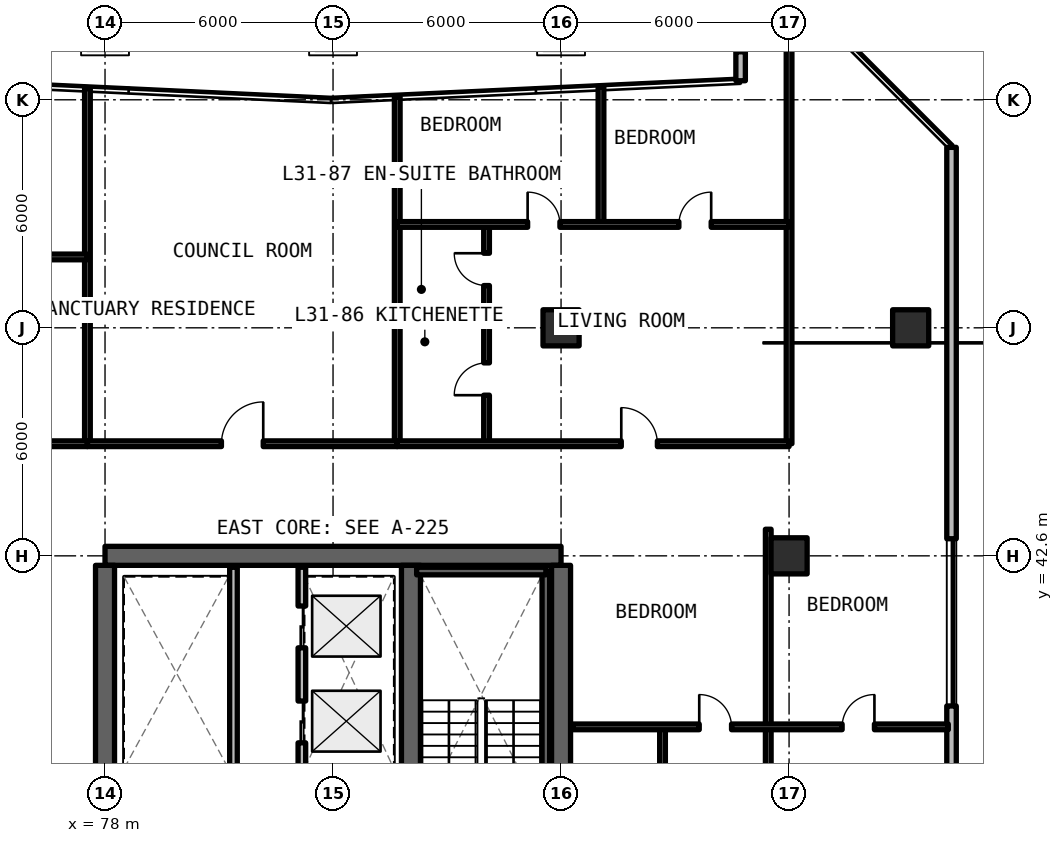
"""IFC4 building model, lengths in metres.
Left out: names, types, materials, properties, quantities, classifications, styles, units other than length and angle.
Written with IfcOpenShell. Run it as: python <this file> out.ifc"""

import sys

from ifc_helpers import new_model, si_unit, direction, frame, frame_2d, origin, origin_2d, place, context, subcontext, project, spatial, rectangle, extrude, element, fill, save


model = new_model("IFC4")
c1 = context("Model", 3, precision=1e-05, world=origin(), true_north=direction((0.0, 1.0)))
c2 = subcontext(c1, "Body", "Model", "MODEL_VIEW")
j1 = project(units=[si_unit("LENGTHUNIT", "METRE"), si_unit("PLANEANGLEUNIT", "RADIAN")], contexts=[c1])
p1 = place(None, origin())
s1 = spatial("IfcSite", under=j1, at=p1, CompositionType="ELEMENT")
p2 = place(p1, origin())
s2 = spatial("IfcBuilding", under=s1, at=p2, CompositionType="ELEMENT")
p3 = place(p2, frame((0.0, 0.0, 112.2)))
s3 = spatial("IfcBuildingStorey", under=s2, at=p3, CompositionType="ELEMENT", Elevation=112.2)
p4 = place(p3, frame((90.0, 42.6, 0.0), z_axis=(0.0, 0.0, 1.0), x_axis=(-1.0, 0.0, 0.0)))
e1 = element("IfcWall", 1, at=p4, inside=s3, PredefinedType="SHEAR", context=c2, shape_type="SweptSolid", body=[
    extrude(rectangle(XDim=12.0, YDim=0.5, at=frame_2d((6.0, 0.0))), origin(), (0.0, 0.0, 1.0), 3.63),
])
p5 = place(p3, frame((90.0, 24.85, 0.0), z_axis=(0.0, 0.0, 1.0), x_axis=(0.0, 1.0, 0.0)))
e2 = element("IfcWall", 2, at=p5, inside=s3, PredefinedType="SHEAR", context=c2, shape_type="SweptSolid", body=[
    extrude(rectangle(XDim=17.5, YDim=0.5, at=frame_2d((8.75, 0.0))), origin(), (0.0, 0.0, 1.0), 3.63),
])
p6 = place(p3, frame((78.0, 36.8, 0.0), z_axis=(0.0, 0.0, 1.0), x_axis=(0.0, 1.0, 0.0)))
e3 = element("IfcWall", 3, at=p6, inside=s3, PredefinedType="SHEAR", context=c2, shape_type="SweptSolid", body=[
    extrude(rectangle(XDim=5.55, YDim=0.5, at=frame_2d((2.775, 0.0))), origin(), (0.0, 0.0, 1.0), 3.63),
])
p7 = place(p3, frame((86.05, 24.85, 0.0), z_axis=(0.0, 0.0, 1.0), x_axis=(0.0, 1.0, 0.0)))
e4 = element("IfcWall", 4, at=p7, inside=s3, PredefinedType="SHEAR", context=c2, shape_type="SweptSolid", body=[
    extrude(rectangle(XDim=17.5, YDim=0.5, at=frame_2d((8.75, 0.0))), origin(), (0.0, 0.0, 1.0), 3.63),
])
p8 = place(p7, frame((0.4, 0.0, 0.0)))
e5 = element("IfcOpeningElement", 5, at=p8, cuts=e4, PredefinedType="OPENING", context=c2, shape_type="SweptSolid", body=[
    extrude(rectangle(XDim=1.15, YDim=2.15, at=frame_2d((0.575, 1.075))), frame((0.0, 0.26, 0.0), z_axis=(0.0, -1.0, 0.0), x_axis=(1.0, 0.0, 0.0)), (0.0, 0.0, 1.0), 0.52),
])
p9 = place(p7, frame((9.6, 0.0, 0.0)))
e6 = element("IfcOpeningElement", 6, at=p9, cuts=e4, PredefinedType="OPENING", context=c2, shape_type="SweptSolid", body=[
    extrude(rectangle(XDim=1.15, YDim=2.15, at=frame_2d((0.575, 1.075))), frame((0.0, 0.26, 0.0), z_axis=(0.0, -1.0, 0.0), x_axis=(1.0, 0.0, 0.0)), (0.0, 0.0, 1.0), 0.52),
])
for number, where, z_axis, x_axis in (
    (7, (96.0, 42.6, 0.0), (0.0, 0.0, 1.0), (1.0, 0.0, 0.0)),
    (8, (90.0, 48.6, 0.0), (0.0, 0.0, 1.0), (1.0, 0.0, 0.0)),
    (9, (99.2, 48.6, 0.0), (0.0, 0.0, 1.0), (1.0, 0.0, 0.0)),
):
    element("IfcColumn", number, at=place(p3, frame(where, z_axis=z_axis, x_axis=x_axis)), inside=s3, PredefinedType="COLUMN", context=c2, shape_type="SweptSolid", body=[
        extrude(rectangle(XDim=0.95, YDim=0.95, at=origin_2d()), origin(), (0.0, 0.0, 1.0), 3.63),
    ])
p10 = place(p3, frame((100.275, 13.852, 0.0), z_axis=(0.0, 0.0, 1.0), x_axis=(0.0, 1.0, 0.0)))
e10 = element("IfcWall", 10, at=p10, inside=s3, PredefinedType="SOLIDWALL", context=c2, shape_type="SweptSolid", body=[
    extrude(rectangle(XDim=39.496, YDim=0.25, at=frame_2d((19.748, 0.0))), origin(), (0.0, 0.0, 1.0), 3.41),
])
p11 = place(p10, frame((14.958, 0.0, 0.78)))
e11 = element("IfcOpeningElement", 11, at=p11, cuts=e10, PredefinedType="OPENING", context=c2, shape_type="SweptSolid", body=[
    extrude(rectangle(XDim=4.4, YDim=1.66, at=frame_2d((2.2, 0.83))), frame((0.0, 0.135, 0.0), z_axis=(0.0, -1.0, 0.0), x_axis=(1.0, 0.0, 0.0)), (0.0, 0.0, 1.0), 0.27),
])
p12 = place(p10, frame((24.798, 0.0, 0.78)))
e12 = element("IfcOpeningElement", 12, at=p12, cuts=e10, PredefinedType="OPENING", context=c2, shape_type="SweptSolid", body=[
    extrude(rectangle(XDim=4.4, YDim=1.66, at=frame_2d((2.2, 0.83))), frame((0.0, 0.135, 0.0), z_axis=(0.0, -1.0, 0.0), x_axis=(1.0, 0.0, 0.0)), (0.0, 0.0, 1.0), 0.27),
])
p13 = place(p10, frame((5.604, 0.0, 0.78)))
e13 = element("IfcOpeningElement", 13, at=p13, cuts=e10, PredefinedType="OPENING", context=c2, shape_type="SweptSolid", body=[
    extrude(rectangle(XDim=1.4, YDim=1.65, at=frame_2d((0.7, 0.825))), frame((0.0, 0.135, 0.0), z_axis=(0.0, -1.0, 0.0), x_axis=(1.0, 0.0, 0.0)), (0.0, 0.0, 1.0), 0.27),
])
p14 = place(p3, frame((94.725, 57.475, 0.0), z_axis=(0.0, 0.0, 1.0), x_axis=(0.0, -1.0, 0.0)))
e14 = element("IfcWall", 14, at=p14, inside=s3, PredefinedType="SOLIDWALL", context=c2, shape_type="SweptSolid", body=[
    extrude(rectangle(XDim=2.375, YDim=0.25, at=frame_2d((1.187, 0.0))), origin(), (0.0, 0.0, 1.0), 3.41),
])
p15 = place(p14, frame((0.762, 0.0, 0.78)))
e15 = element("IfcOpeningElement", 15, at=p15, cuts=e14, PredefinedType="OPENING", context=c2, shape_type="SweptSolid", body=[
    extrude(rectangle(XDim=0.85, YDim=1.65, at=frame_2d((0.425, 0.825))), frame((0.0, 0.135, 0.0), z_axis=(0.0, -1.0, 0.0), x_axis=(1.0, 0.0, 0.0)), (0.0, 0.0, 1.0), 0.27),
])
p16 = place(p3, frame((83.18, 36.88, 0.0), z_axis=(0.0, 0.0, 1.0), x_axis=(0.0, 1.0, 0.0)))
e16 = element("IfcWall", 16, at=p16, inside=s3, PredefinedType="SOLIDWALL", context=c2, shape_type="SweptSolid", body=[
    extrude(rectangle(XDim=5.42, YDim=0.2, at=frame_2d((2.71, 0.0))), origin(), (0.0, 0.0, 1.0), 2.63),
])
p17 = place(p16, frame((0.8, 0.0, 0.0)))
e17 = element("IfcOpeningElement", 17, at=p17, cuts=e16, PredefinedType="OPENING", context=c2, shape_type="SweptSolid", body=[
    extrude(rectangle(XDim=1.1, YDim=2.2, at=frame_2d((0.55, 1.1))), frame((0.0, 0.11, 0.0), z_axis=(0.0, -1.0, 0.0), x_axis=(1.0, 0.0, 0.0)), (0.0, 0.0, 1.0), 0.22),
])
p18 = place(p16, frame((3.3, 0.0, 0.0)))
e18 = element("IfcOpeningElement", 18, at=p18, cuts=e16, PredefinedType="OPENING", context=c2, shape_type="SweptSolid", body=[
    extrude(rectangle(XDim=1.1, YDim=2.2, at=frame_2d((0.55, 1.1))), frame((0.0, 0.11, 0.0), z_axis=(0.0, -1.0, 0.0), x_axis=(1.0, 0.0, 0.0)), (0.0, 0.0, 1.0), 0.22),
])
p19 = place(p3, frame((81.38, 36.88, 0.0), z_axis=(0.0, 0.0, 1.0), x_axis=(0.0, 1.0, 0.0)))
e19 = element("IfcWall", 19, at=p19, inside=s3, PredefinedType="SOLIDWALL", context=c2, shape_type="SweptSolid", body=[
    extrude(rectangle(XDim=5.42, YDim=0.2, at=frame_2d((2.71, 0.0))), origin(), (0.0, 0.0, 1.0), 2.63),
])
p20 = place(p3, frame((95.452, 23.9, 0.0), z_axis=(0.0, 0.0, 1.0), x_axis=(0.0, 1.0, 0.0)))
e20 = element("IfcWall", 20, at=p20, inside=s3, PredefinedType="PARTITIONING", context=c2, shape_type="SweptSolid", body=[
    extrude(rectangle(XDim=14.2, YDim=0.15, at=frame_2d((7.1, 0.0))), origin(), (0.0, 0.0, 1.0), 2.63),
])
p21 = place(p20, frame((6.675, 0.0, 0.0)))
e21 = element("IfcOpeningElement", 21, at=p21, cuts=e20, PredefinedType="OPENING", context=c2, shape_type="SweptSolid", body=[
    extrude(rectangle(XDim=0.85, YDim=2.1, at=frame_2d((0.425, 1.05))), frame((0.0, 0.085, 0.0), z_axis=(0.0, -1.0, 0.0), x_axis=(1.0, 0.0, 0.0)), (0.0, 0.0, 1.0), 0.17),
])
p22 = place(p3, frame((92.67, 23.9, 0.0), z_axis=(0.0, 0.0, 1.0), x_axis=(0.0, 1.0, 0.0)))
e22 = element("IfcWall", 22, at=p22, inside=s3, PredefinedType="PARTITIONING", context=c2, shape_type="SweptSolid", body=[
    extrude(rectangle(XDim=14.2, YDim=0.15, at=frame_2d((7.1, 0.0))), origin(), (0.0, 0.0, 1.0), 2.63),
])
p23 = place(p22, frame((3.764, 0.0, 0.0)))
e23 = element("IfcOpeningElement", 23, at=p23, cuts=e22, PredefinedType="OPENING", context=c2, shape_type="SweptSolid", body=[
    extrude(rectangle(XDim=0.85, YDim=2.1, at=frame_2d((0.425, 1.05))), frame((0.0, 0.085, 0.0), z_axis=(0.0, -1.0, 0.0), x_axis=(1.0, 0.0, 0.0)), (0.0, 0.0, 1.0), 0.17),
])
p24 = place(p22, frame((10.864, 0.0, 0.0)))
e24 = element("IfcOpeningElement", 24, at=p24, cuts=e22, PredefinedType="OPENING", context=c2, shape_type="SweptSolid", body=[
    extrude(rectangle(XDim=0.85, YDim=2.1, at=frame_2d((0.425, 1.05))), frame((0.0, 0.085, 0.0), z_axis=(0.0, -1.0, 0.0), x_axis=(1.0, 0.0, 0.0)), (0.0, 0.0, 1.0), 0.17),
])
p25 = place(p3, frame((95.452, 38.1, 0.0), z_axis=(0.0, 0.0, 1.0), x_axis=(0.0, 1.0, 0.0)))
e25 = element("IfcWall", 25, at=p25, inside=s3, PredefinedType="PARTITIONING", context=c2, shape_type="SweptSolid", body=[
    extrude(rectangle(XDim=5.2, YDim=0.15, at=frame_2d((2.6, 0.0))), origin(), (0.0, 0.0, 1.0), 2.63),
])
p26 = place(p3, frame((90.32, 38.1, 0.0), z_axis=(0.0, 0.0, 1.0), x_axis=(1.0, 0.0, 0.0)))
e26 = element("IfcWall", 26, at=p26, inside=s3, PredefinedType="PARTITIONING", context=c2, shape_type="SweptSolid", body=[
    extrude(rectangle(XDim=9.87, YDim=0.15, at=frame_2d((4.935, 0.0))), origin(), (0.0, 0.0, 1.0), 2.63),
])
p27 = place(p26, frame((3.316, 0.0, 0.0)))
e27 = element("IfcOpeningElement", 27, at=p27, cuts=e26, PredefinedType="OPENING", context=c2, shape_type="SweptSolid", body=[
    extrude(rectangle(XDim=0.85, YDim=2.1, at=frame_2d((0.425, 1.05))), frame((0.0, 0.085, 0.0), z_axis=(0.0, -1.0, 0.0), x_axis=(1.0, 0.0, 0.0)), (0.0, 0.0, 1.0), 0.17),
])
p28 = place(p26, frame((7.076, 0.0, 0.0)))
e28 = element("IfcOpeningElement", 28, at=p28, cuts=e26, PredefinedType="OPENING", context=c2, shape_type="SweptSolid", body=[
    extrude(rectangle(XDim=0.85, YDim=2.1, at=frame_2d((0.425, 1.05))), frame((0.0, 0.085, 0.0), z_axis=(0.0, -1.0, 0.0), x_axis=(1.0, 0.0, 0.0)), (0.0, 0.0, 1.0), 0.17),
])
p29 = place(p3, frame((96.0, 45.55, 0.0), z_axis=(0.0, 0.0, 1.0), x_axis=(0.0, 1.0, 0.0)))
e29 = element("IfcWall", 29, at=p29, inside=s3, PredefinedType="SOLIDWALL", context=c2, shape_type="SweptSolid", body=[
    extrude(rectangle(XDim=11.925, YDim=0.15, at=frame_2d((5.962, 0.0))), origin(), (0.0, 0.0, 1.0), 2.63),
])
p30 = place(p3, frame((77.537, 45.55, 0.0), z_axis=(0.0, 0.0, 1.0), x_axis=(0.0, 1.0, 0.0)))
e30 = element("IfcWall", 30, at=p30, inside=s3, PredefinedType="SOLIDWALL", context=c2, shape_type="SweptSolid", body=[
    extrude(rectangle(XDim=9.346, YDim=0.15, at=frame_2d((4.673, 0.0))), origin(), (0.0, 0.0, 1.0), 2.63),
])
p31 = place(p3, frame((70.583, 50.465, 0.0), z_axis=(0.0, 0.0, 1.0), x_axis=(1.0, 0.0, 0.0)))
e31 = element("IfcWall", 31, at=p31, inside=s3, PredefinedType="PARTITIONING", context=c2, shape_type="SweptSolid", body=[
    extrude(rectangle(XDim=6.954, YDim=0.15, at=frame_2d((3.477, 0.0))), origin(), (0.0, 0.0, 1.0), 2.63),
])
p32 = place(p31, frame((4.267, 0.0, 0.0)))
e32 = element("IfcOpeningElement", 32, at=p32, cuts=e31, PredefinedType="OPENING", context=c2, shape_type="SweptSolid", body=[
    extrude(rectangle(XDim=0.85, YDim=2.1, at=frame_2d((0.425, 1.05))), frame((0.0, 0.085, 0.0), z_axis=(0.0, -1.0, 0.0), x_axis=(1.0, 0.0, 0.0)), (0.0, 0.0, 1.0), 0.17),
])
p33 = place(p3, frame((70.583, 45.55, 0.0), z_axis=(0.0, 0.0, 1.0), x_axis=(1.0, 0.0, 0.0)))
e33 = element("IfcWall", 33, at=p33, inside=s3, PredefinedType="SOLIDWALL", context=c2, shape_type="SweptSolid", body=[
    extrude(rectangle(XDim=6.954, YDim=0.15, at=frame_2d((3.477, 0.0))), origin(), (0.0, 0.0, 1.0), 2.63),
])
p34 = place(p33, frame((4.217, 0.0, 0.0)))
e34 = element("IfcOpeningElement", 34, at=p34, cuts=e33, PredefinedType="OPENING", context=c2, shape_type="SweptSolid", body=[
    extrude(rectangle(XDim=0.95, YDim=2.15, at=frame_2d((0.475, 1.075))), frame((0.0, 0.085, 0.0), z_axis=(0.0, -1.0, 0.0), x_axis=(1.0, 0.0, 0.0)), (0.0, 0.0, 1.0), 0.17),
])
p35 = place(p3, frame((85.689, 45.55, 0.0), z_axis=(0.0, 0.0, 1.0), x_axis=(0.0, 1.0, 0.0)))
e35 = element("IfcWall", 35, at=p35, inside=s3, PredefinedType="SOLIDWALL", context=c2, shape_type="SweptSolid", body=[
    extrude(rectangle(XDim=9.126, YDim=0.15, at=frame_2d((4.563, 0.0))), origin(), (0.0, 0.0, 1.0), 2.63),
])
p36 = place(p3, frame((77.537, 45.55, 0.0), z_axis=(0.0, 0.0, 1.0), x_axis=(1.0, 0.0, 0.0)))
e36 = element("IfcWall", 36, at=p36, inside=s3, PredefinedType="SOLIDWALL", context=c2, shape_type="SweptSolid", body=[
    extrude(rectangle(XDim=8.153, YDim=0.15, at=frame_2d((4.076, 0.0))), origin(), (0.0, 0.0, 1.0), 2.63),
])
p37 = place(p36, frame((3.526, 0.0, 0.0)))
e37 = element("IfcOpeningElement", 37, at=p37, cuts=e36, PredefinedType="OPENING", context=c2, shape_type="SweptSolid", body=[
    extrude(rectangle(XDim=1.1, YDim=2.15, at=frame_2d((0.55, 1.075))), frame((0.0, 0.085, 0.0), z_axis=(0.0, -1.0, 0.0), x_axis=(1.0, 0.0, 0.0)), (0.0, 0.0, 1.0), 0.17),
])
p38 = place(p3, frame((85.689, 48.954, 0.0), z_axis=(0.0, 0.0, 1.0), x_axis=(1.0, 0.0, 0.0)))
e38 = element("IfcWall", 38, at=p38, inside=s3, PredefinedType="PARTITIONING", context=c2, shape_type="SweptSolid", body=[
    extrude(rectangle(XDim=2.35, YDim=0.15, at=frame_2d((1.175, 0.0))), origin(), (0.0, 0.0, 1.0), 2.63),
])
p39 = place(p3, frame((88.04, 45.55, 0.0), z_axis=(0.0, 0.0, 1.0), x_axis=(0.0, 1.0, 0.0)))
e39 = element("IfcWall", 39, at=p39, inside=s3, PredefinedType="PARTITIONING", context=c2, shape_type="SweptSolid", body=[
    extrude(rectangle(XDim=5.77, YDim=0.15, at=frame_2d((2.885, 0.0))), origin(), (0.0, 0.0, 1.0), 2.63),
])
p40 = place(p39, frame((1.277, 0.0, 0.0)))
e40 = element("IfcOpeningElement", 40, at=p40, cuts=e39, PredefinedType="OPENING", context=c2, shape_type="SweptSolid", body=[
    extrude(rectangle(XDim=0.85, YDim=2.1, at=frame_2d((0.425, 1.05))), frame((0.0, 0.085, 0.0), z_axis=(0.0, -1.0, 0.0), x_axis=(1.0, 0.0, 0.0)), (0.0, 0.0, 1.0), 0.17),
])
p41 = place(p39, frame((4.162, 0.0, 0.0)))
e41 = element("IfcOpeningElement", 41, at=p41, cuts=e39, PredefinedType="OPENING", context=c2, shape_type="SweptSolid", body=[
    extrude(rectangle(XDim=0.85, YDim=2.1, at=frame_2d((0.425, 1.05))), frame((0.0, 0.085, 0.0), z_axis=(0.0, -1.0, 0.0), x_axis=(1.0, 0.0, 0.0)), (0.0, 0.0, 1.0), 0.17),
])
p42 = place(p3, frame((91.051, 51.32, 0.0), z_axis=(0.0, 0.0, 1.0), x_axis=(0.0, 1.0, 0.0)))
e42 = element("IfcWall", 42, at=p42, inside=s3, PredefinedType="PARTITIONING", context=c2, shape_type="SweptSolid", body=[
    extrude(rectangle(XDim=3.608, YDim=0.15, at=frame_2d((1.804, 0.0))), origin(), (0.0, 0.0, 1.0), 2.63),
])
p43 = place(p3, frame((85.689, 51.32, 0.0), z_axis=(0.0, 0.0, 1.0), x_axis=(1.0, 0.0, 0.0)))
e43 = element("IfcWall", 43, at=p43, inside=s3, PredefinedType="PARTITIONING", context=c2, shape_type="SweptSolid", body=[
    extrude(rectangle(XDim=10.311, YDim=0.15, at=frame_2d((5.155, 0.0))), origin(), (0.0, 0.0, 1.0), 2.63),
])
p44 = place(p43, frame((3.431, 0.0, 0.0)))
e44 = element("IfcOpeningElement", 44, at=p44, cuts=e43, PredefinedType="OPENING", context=c2, shape_type="SweptSolid", body=[
    extrude(rectangle(XDim=0.85, YDim=2.1, at=frame_2d((0.425, 1.05))), frame((0.0, 0.085, 0.0), z_axis=(0.0, -1.0, 0.0), x_axis=(1.0, 0.0, 0.0)), (0.0, 0.0, 1.0), 0.17),
])
p45 = place(p43, frame((7.411, 0.0, 0.0)))
e45 = element("IfcOpeningElement", 45, at=p45, cuts=e43, PredefinedType="OPENING", context=c2, shape_type="SweptSolid", body=[
    extrude(rectangle(XDim=0.85, YDim=2.1, at=frame_2d((0.425, 1.05))), frame((0.0, 0.085, 0.0), z_axis=(0.0, -1.0, 0.0), x_axis=(1.0, 0.0, 0.0)), (0.0, 0.0, 1.0), 0.17),
])
p46 = place(p3, frame((85.689, 45.55, 0.0), z_axis=(0.0, 0.0, 1.0), x_axis=(1.0, 0.0, 0.0)))
e46 = element("IfcWall", 46, at=p46, inside=s3, PredefinedType="SOLIDWALL", context=c2, shape_type="SweptSolid", body=[
    extrude(rectangle(XDim=10.311, YDim=0.15, at=frame_2d((5.155, 0.0))), origin(), (0.0, 0.0, 1.0), 2.63),
])
p47 = place(p46, frame((5.895, 0.0, 0.0)))
e47 = element("IfcOpeningElement", 47, at=p47, cuts=e46, PredefinedType="OPENING", context=c2, shape_type="SweptSolid", body=[
    extrude(rectangle(XDim=0.95, YDim=2.15, at=frame_2d((0.475, 1.075))), frame((0.0, 0.085, 0.0), z_axis=(0.0, -1.0, 0.0), x_axis=(1.0, 0.0, 0.0)), (0.0, 0.0, 1.0), 0.17),
])
p48 = place(p3, frame((89.6, 34.2, 0.0), z_axis=(0.0, 0.0, 1.0), x_axis=(0.0, 1.0, 0.0)))
e48 = element("IfcWall", 48, at=p48, inside=s3, PredefinedType="SOLIDWALL", context=c2, shape_type="SweptSolid", body=[
    extrude(rectangle(XDim=8.0, YDim=0.2, at=frame_2d((4.0, 0.0))), origin(), (0.0, 0.0, 1.0), 3.63),
])
p49 = place(p3, frame((89.6, 42.2, 0.0), z_axis=(0.0, 0.0, 1.0), x_axis=(-1.0, 0.0, 0.0)))
e49 = element("IfcWall", 49, at=p49, inside=s3, PredefinedType="SOLIDWALL", context=c2, shape_type="SweptSolid", body=[
    extrude(rectangle(XDim=3.4, YDim=0.2, at=frame_2d((1.7, 0.0))), origin(), (0.0, 0.0, 1.0), 3.63),
])
p50 = place(p12, origin())
e50 = element("IfcWindow", 50, at=p50, inside=s3, PartitioningType="SINGLE_PANEL", PredefinedType="WINDOW", context=c2, shape_type="SweptSolid", body=[
    extrude(rectangle(XDim=4.4, YDim=1.66, at=frame_2d((2.2, 0.83))), frame((0.0, 0.03, 0.0), z_axis=(0.0, -1.0, 0.0), x_axis=(1.0, 0.0, 0.0)), (0.0, 0.0, 1.0), 0.06),
])
fill(e12, e50)
p51 = place(p17, origin())
e51 = element("IfcDoor", 51, at=p51, inside=s3, OperationType="SLIDING_TO_LEFT", PredefinedType="DOOR", context=c2, shape_type="SweptSolid", body=[
    extrude(rectangle(XDim=1.1, YDim=2.2, at=frame_2d((0.55, 1.1))), frame((0.0, 0.025, 0.0), z_axis=(0.0, -1.0, 0.0), x_axis=(1.0, 0.0, 0.0)), (0.0, 0.0, 1.0), 0.05),
])
fill(e17, e51)
p52 = place(p18, origin())
e52 = element("IfcDoor", 52, at=p52, inside=s3, OperationType="SLIDING_TO_RIGHT", PredefinedType="DOOR", context=c2, shape_type="SweptSolid", body=[
    extrude(rectangle(XDim=1.1, YDim=2.2, at=frame_2d((0.55, 1.1))), frame((0.0, 0.025, 0.0), z_axis=(0.0, -1.0, 0.0), x_axis=(1.0, 0.0, 0.0)), (0.0, 0.0, 1.0), 0.05),
])
fill(e18, e52)
p53 = place(p27, origin())
e53 = element("IfcDoor", 53, at=p53, inside=s3, OperationType="SINGLE_SWING_LEFT", PredefinedType="DOOR", context=c2, shape_type="SweptSolid", body=[
    extrude(rectangle(XDim=0.85, YDim=2.1, at=frame_2d((0.425, 1.05))), frame((0.0, 0.025, 0.0), z_axis=(0.0, -1.0, 0.0), x_axis=(1.0, 0.0, 0.0)), (0.0, 0.0, 1.0), 0.05),
])
fill(e27, e53)
p54 = place(p28, origin())
e54 = element("IfcDoor", 54, at=p54, inside=s3, OperationType="SINGLE_SWING_RIGHT", PredefinedType="DOOR", context=c2, shape_type="SweptSolid", body=[
    extrude(rectangle(XDim=0.85, YDim=2.1, at=frame_2d((0.425, 1.05))), frame((0.0, 0.025, 0.0), z_axis=(0.0, -1.0, 0.0), x_axis=(1.0, 0.0, 0.0)), (0.0, 0.0, 1.0), 0.05),
])
fill(e28, e54)
p55 = place(p37, origin())
e55 = element("IfcDoor", 55, at=p55, inside=s3, OperationType="SINGLE_SWING_RIGHT", PredefinedType="DOOR", context=c2, shape_type="SweptSolid", body=[
    extrude(rectangle(XDim=1.1, YDim=2.15, at=frame_2d((0.55, 1.075))), frame((0.0, 0.025, 0.0), z_axis=(0.0, -1.0, 0.0), x_axis=(1.0, 0.0, 0.0)), (0.0, 0.0, 1.0), 0.05),
])
fill(e37, e55)
p56 = place(p40, origin())
e56 = element("IfcDoor", 56, at=p56, inside=s3, OperationType="SINGLE_SWING_LEFT", PredefinedType="DOOR", context=c2, shape_type="SweptSolid", body=[
    extrude(rectangle(XDim=0.85, YDim=2.1, at=frame_2d((0.425, 1.05))), frame((0.0, 0.025, 0.0), z_axis=(0.0, -1.0, 0.0), x_axis=(1.0, 0.0, 0.0)), (0.0, 0.0, 1.0), 0.05),
])
fill(e40, e56)
p57 = place(p41, origin())
e57 = element("IfcDoor", 57, at=p57, inside=s3, OperationType="SINGLE_SWING_RIGHT", PredefinedType="DOOR", context=c2, shape_type="SweptSolid", body=[
    extrude(rectangle(XDim=0.85, YDim=2.1, at=frame_2d((0.425, 1.05))), frame((0.0, 0.025, 0.0), z_axis=(0.0, -1.0, 0.0), x_axis=(1.0, 0.0, 0.0)), (0.0, 0.0, 1.0), 0.05),
])
fill(e41, e57)
p58 = place(p44, origin())
e58 = element("IfcDoor", 58, at=p58, inside=s3, OperationType="SINGLE_SWING_LEFT", PredefinedType="DOOR", context=c2, shape_type="SweptSolid", body=[
    extrude(rectangle(XDim=0.85, YDim=2.1, at=frame_2d((0.425, 1.05))), frame((0.0, 0.025, 0.0), z_axis=(0.0, -1.0, 0.0), x_axis=(1.0, 0.0, 0.0)), (0.0, 0.0, 1.0), 0.05),
])
fill(e44, e58)
p59 = place(p45, origin())
e59 = element("IfcDoor", 59, at=p59, inside=s3, OperationType="SINGLE_SWING_RIGHT", PredefinedType="DOOR", context=c2, shape_type="SweptSolid", body=[
    extrude(rectangle(XDim=0.85, YDim=2.1, at=frame_2d((0.425, 1.05))), frame((0.0, 0.025, 0.0), z_axis=(0.0, -1.0, 0.0), x_axis=(1.0, 0.0, 0.0)), (0.0, 0.0, 1.0), 0.05),
])
fill(e45, e59)
p60 = place(p47, origin())
e60 = element("IfcDoor", 60, at=p60, inside=s3, OperationType="SINGLE_SWING_LEFT", PredefinedType="DOOR", context=c2, shape_type="SweptSolid", body=[
    extrude(rectangle(XDim=0.95, YDim=2.15, at=frame_2d((0.475, 1.075))), frame((0.0, 0.025, 0.0), z_axis=(0.0, -1.0, 0.0), x_axis=(1.0, 0.0, 0.0)), (0.0, 0.0, 1.0), 0.05),
])
fill(e47, e60)
save(model, sys.argv[1])
